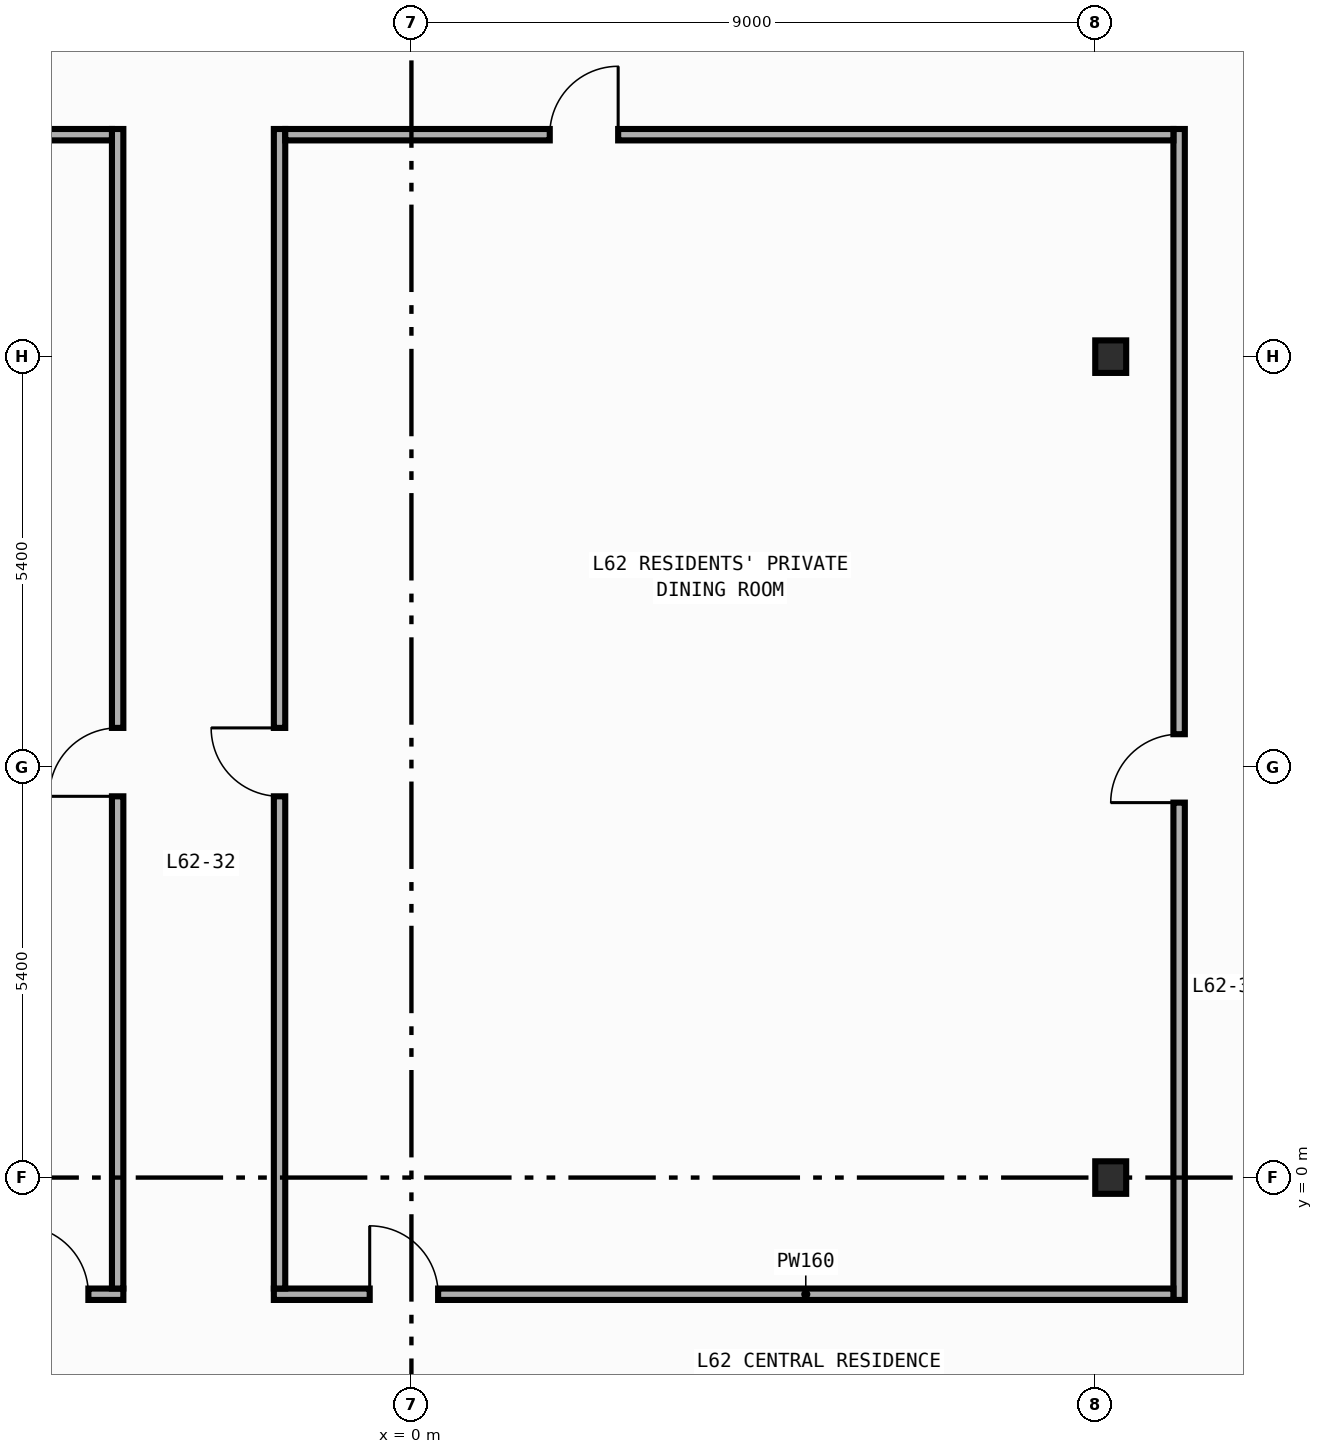
"""IFC4 building model, lengths in metres.
Left out: names, types, materials, properties, quantities, classifications, styles, units other than length and angle.
Written with IfcOpenShell. Run it as: python <this file> out.ifc"""

import sys

from ifc_helpers import new_model, si_unit, direction, frame, frame_2d, origin, origin_2d, place, context, subcontext, project, spatial, rectangle, i_section, extrude, element, fill, save


model = new_model("IFC4")
c1 = context("Model", 3, precision=1e-05, world=origin(), true_north=direction((0.0, 1.0)))
c2 = subcontext(c1, "Body", "Model", "MODEL_VIEW")
j1 = project(units=[si_unit("LENGTHUNIT", "METRE"), si_unit("PLANEANGLEUNIT", "RADIAN")], contexts=[c1])
p1 = place(None, origin())
s1 = spatial("IfcSite", under=j1, at=p1, CompositionType="ELEMENT")
p2 = place(p1, origin())
s2 = spatial("IfcBuilding", under=s1, at=p2, CompositionType="ELEMENT")
p3 = place(p2, frame((0.0, 0.0, 262.0)))
s3 = spatial("IfcBuildingStorey", under=s2, at=p3, CompositionType="ELEMENT", Elevation=262.0)
for number, where, z_axis, x_axis in (
    (1, (9.2, 0.0, 0.0), (0.0, 0.0, 1.0), (1.0, 0.0, 0.0)),
    (2, (9.2, 10.8, 0.0), (0.0, 0.0, 1.0), (1.0, 0.0, 0.0)),
):
    element("IfcColumn", number, at=place(p3, frame(where, z_axis=z_axis, x_axis=x_axis)), inside=s3, PredefinedType="COLUMN", context=c2, shape_type="SweptSolid", body=[
        extrude(i_section(OverallWidth=0.407, OverallDepth=0.428, WebThickness=0.02, FlangeThickness=0.035, FilletRadius=0.022, at=origin_2d()), origin(), (0.0, 0.0, 1.0), 3.6),
    ])
p4 = place(p3, frame((10.1, -1.61, 0.0), z_axis=(0.0, 0.0, 1.0), x_axis=(0.0, 1.0, 0.0)))
e3 = element("IfcWall", 3, at=p4, inside=s3, PredefinedType="PARTITIONING", context=c2, shape_type="SweptSolid", body=[
    extrude(rectangle(XDim=15.405, YDim=0.15, at=frame_2d((7.703, 0.0))), origin(), (0.0, 0.0, 1.0), 3.34),
])
p5 = place(p4, frame((6.543, 0.0, 0.0)))
e4 = element("IfcOpeningElement", 4, at=p5, cuts=e3, PredefinedType="OPENING", context=c2, shape_type="SweptSolid", body=[
    extrude(rectangle(XDim=0.9, YDim=2.15, at=frame_2d((0.45, 1.075))), frame((0.0, 0.085, 0.0), z_axis=(0.0, -1.0, 0.0), x_axis=(1.0, 0.0, 0.0)), (0.0, 0.0, 1.0), 0.17),
])
p6 = place(p3, frame((-10.025, -1.535, 0.0), z_axis=(0.0, 0.0, 1.0), x_axis=(1.0, 0.0, 0.0)))
e5 = element("IfcWall", 5, at=p6, inside=s3, PredefinedType="PARTITIONING", context=c2, shape_type="SweptSolid", body=[
    extrude(rectangle(XDim=6.235, YDim=0.15, at=frame_2d((3.117, 0.0))), origin(), (0.0, 0.0, 1.0), 3.34),
])
p7 = place(p6, frame((4.875, 0.0, 0.0)))
e6 = element("IfcOpeningElement", 6, at=p7, cuts=e5, PredefinedType="OPENING", context=c2, shape_type="SweptSolid", body=[
    extrude(rectangle(XDim=0.9, YDim=2.15, at=frame_2d((0.45, 1.075))), frame((0.0, 0.085, 0.0), z_axis=(0.0, -1.0, 0.0), x_axis=(1.0, 0.0, 0.0)), (0.0, 0.0, 1.0), 0.17),
])
p8 = place(p3, frame((-1.81, -1.535, 0.0), z_axis=(0.0, 0.0, 1.0), x_axis=(1.0, 0.0, 0.0)))
e7 = element("IfcWall", 7, at=p8, inside=s3, PredefinedType="PARTITIONING", context=c2, shape_type="SweptSolid", body=[
    extrude(rectangle(XDim=11.835, YDim=0.15, at=frame_2d((5.917, 0.0))), origin(), (0.0, 0.0, 1.0), 3.34),
])
p9 = place(p8, frame((1.261, 0.0, 0.0)))
e8 = element("IfcOpeningElement", 8, at=p9, cuts=e7, PredefinedType="OPENING", context=c2, shape_type="SweptSolid", body=[
    extrude(rectangle(XDim=0.9, YDim=2.15, at=frame_2d((0.45, 1.075))), frame((0.0, 0.085, 0.0), z_axis=(0.0, -1.0, 0.0), x_axis=(1.0, 0.0, 0.0)), (0.0, 0.0, 1.0), 0.17),
])
p10 = place(p3, frame((-3.865, -1.46, 0.0), z_axis=(0.0, 0.0, 1.0), x_axis=(0.0, 1.0, 0.0)))
e9 = element("IfcWall", 9, at=p10, inside=s3, PredefinedType="PARTITIONING", context=c2, shape_type="SweptSolid", body=[
    extrude(rectangle(XDim=15.255, YDim=0.15, at=frame_2d((7.627, 0.0))), origin(), (0.0, 0.0, 1.0), 3.34),
])
p11 = place(p10, frame((6.476, 0.0, 0.0)))
e10 = element("IfcOpeningElement", 10, at=p11, cuts=e9, PredefinedType="OPENING", context=c2, shape_type="SweptSolid", body=[
    extrude(rectangle(XDim=0.9, YDim=2.15, at=frame_2d((0.45, 1.075))), frame((0.0, 0.085, 0.0), z_axis=(0.0, -1.0, 0.0), x_axis=(1.0, 0.0, 0.0)), (0.0, 0.0, 1.0), 0.17),
])
p12 = place(p3, frame((-1.735, -1.46, 0.0), z_axis=(0.0, 0.0, 1.0), x_axis=(0.0, 1.0, 0.0)))
e11 = element("IfcWall", 11, at=p12, inside=s3, PredefinedType="PARTITIONING", context=c2, shape_type="SweptSolid", body=[
    extrude(rectangle(XDim=15.255, YDim=0.15, at=frame_2d((7.627, 0.0))), origin(), (0.0, 0.0, 1.0), 3.34),
])
p13 = place(p12, frame((6.476, 0.0, 0.0)))
e12 = element("IfcOpeningElement", 12, at=p13, cuts=e11, PredefinedType="OPENING", context=c2, shape_type="SweptSolid", body=[
    extrude(rectangle(XDim=0.9, YDim=2.15, at=frame_2d((0.45, 1.075))), frame((0.0, 0.085, 0.0), z_axis=(0.0, -1.0, 0.0), x_axis=(1.0, 0.0, 0.0)), (0.0, 0.0, 1.0), 0.17),
])
p14 = place(p3, frame((-10.025, 13.72, 0.0), z_axis=(0.0, 0.0, 1.0), x_axis=(1.0, 0.0, 0.0)))
e13 = element("IfcWall", 13, at=p14, inside=s3, PredefinedType="PARTITIONING", context=c2, shape_type="SweptSolid", body=[
    extrude(rectangle(XDim=6.085, YDim=0.15, at=frame_2d((3.042, 0.0))), origin(), (0.0, 0.0, 1.0), 3.34),
])
p15 = place(p14, frame((4.116, 0.0, 0.0)))
e14 = element("IfcOpeningElement", 14, at=p15, cuts=e13, PredefinedType="OPENING", context=c2, shape_type="SweptSolid", body=[
    extrude(rectangle(XDim=0.9, YDim=2.15, at=frame_2d((0.45, 1.075))), frame((0.0, 0.085, 0.0), z_axis=(0.0, -1.0, 0.0), x_axis=(1.0, 0.0, 0.0)), (0.0, 0.0, 1.0), 0.17),
])
p16 = place(p3, frame((-1.66, 13.72, 0.0), z_axis=(0.0, 0.0, 1.0), x_axis=(1.0, 0.0, 0.0)))
e15 = element("IfcWall", 15, at=p16, inside=s3, PredefinedType="PARTITIONING", context=c2, shape_type="SweptSolid", body=[
    extrude(rectangle(XDim=11.685, YDim=0.15, at=frame_2d((5.842, 0.0))), origin(), (0.0, 0.0, 1.0), 3.34),
])
p17 = place(p16, frame((3.48, 0.0, 0.0)))
e16 = element("IfcOpeningElement", 16, at=p17, cuts=e15, PredefinedType="OPENING", context=c2, shape_type="SweptSolid", body=[
    extrude(rectangle(XDim=0.9, YDim=2.15, at=frame_2d((0.45, 1.075))), frame((0.0, 0.085, 0.0), z_axis=(0.0, -1.0, 0.0), x_axis=(1.0, 0.0, 0.0)), (0.0, 0.0, 1.0), 0.17),
])
p18 = place(p5, origin())
e17 = element("IfcDoor", 17, at=p18, inside=s3, OperationType="SINGLE_SWING_LEFT", PredefinedType="DOOR", context=c2, shape_type="SweptSolid", body=[
    extrude(rectangle(XDim=0.9, YDim=2.15, at=frame_2d((0.45, 1.075))), frame((0.0, 0.025, 0.0), z_axis=(0.0, -1.0, 0.0), x_axis=(1.0, 0.0, 0.0)), (0.0, 0.0, 1.0), 0.05),
])
fill(e4, e17)
p19 = place(p7, origin())
e18 = element("IfcDoor", 18, at=p19, inside=s3, OperationType="SINGLE_SWING_LEFT", PredefinedType="DOOR", context=c2, shape_type="SweptSolid", body=[
    extrude(rectangle(XDim=0.9, YDim=2.15, at=frame_2d((0.45, 1.075))), frame((0.0, 0.025, 0.0), z_axis=(0.0, -1.0, 0.0), x_axis=(1.0, 0.0, 0.0)), (0.0, 0.0, 1.0), 0.05),
])
fill(e6, e18)
p20 = place(p9, origin())
e19 = element("IfcDoor", 19, at=p20, inside=s3, OperationType="SINGLE_SWING_LEFT", PredefinedType="DOOR", context=c2, shape_type="SweptSolid", body=[
    extrude(rectangle(XDim=0.9, YDim=2.15, at=frame_2d((0.45, 1.075))), frame((0.0, 0.025, 0.0), z_axis=(0.0, -1.0, 0.0), x_axis=(1.0, 0.0, 0.0)), (0.0, 0.0, 1.0), 0.05),
])
fill(e8, e19)
p21 = place(p11, origin())
e20 = element("IfcDoor", 20, at=p21, inside=s3, OperationType="SINGLE_SWING_LEFT", PredefinedType="DOOR", context=c2, shape_type="SweptSolid", body=[
    extrude(rectangle(XDim=0.9, YDim=2.15, at=frame_2d((0.45, 1.075))), frame((0.0, 0.025, 0.0), z_axis=(0.0, -1.0, 0.0), x_axis=(1.0, 0.0, 0.0)), (0.0, 0.0, 1.0), 0.05),
])
fill(e10, e20)
p22 = place(p13, origin())
e21 = element("IfcDoor", 21, at=p22, inside=s3, OperationType="SINGLE_SWING_RIGHT", PredefinedType="DOOR", context=c2, shape_type="SweptSolid", body=[
    extrude(rectangle(XDim=0.9, YDim=2.15, at=frame_2d((0.45, 1.075))), frame((0.0, 0.025, 0.0), z_axis=(0.0, -1.0, 0.0), x_axis=(1.0, 0.0, 0.0)), (0.0, 0.0, 1.0), 0.05),
])
fill(e12, e21)
p23 = place(p17, origin())
e22 = element("IfcDoor", 22, at=p23, inside=s3, OperationType="SINGLE_SWING_RIGHT", PredefinedType="DOOR", context=c2, shape_type="SweptSolid", body=[
    extrude(rectangle(XDim=0.9, YDim=2.15, at=frame_2d((0.45, 1.075))), frame((0.0, 0.025, 0.0), z_axis=(0.0, -1.0, 0.0), x_axis=(1.0, 0.0, 0.0)), (0.0, 0.0, 1.0), 0.05),
])
fill(e16, e22)
save(model, sys.argv[1])
